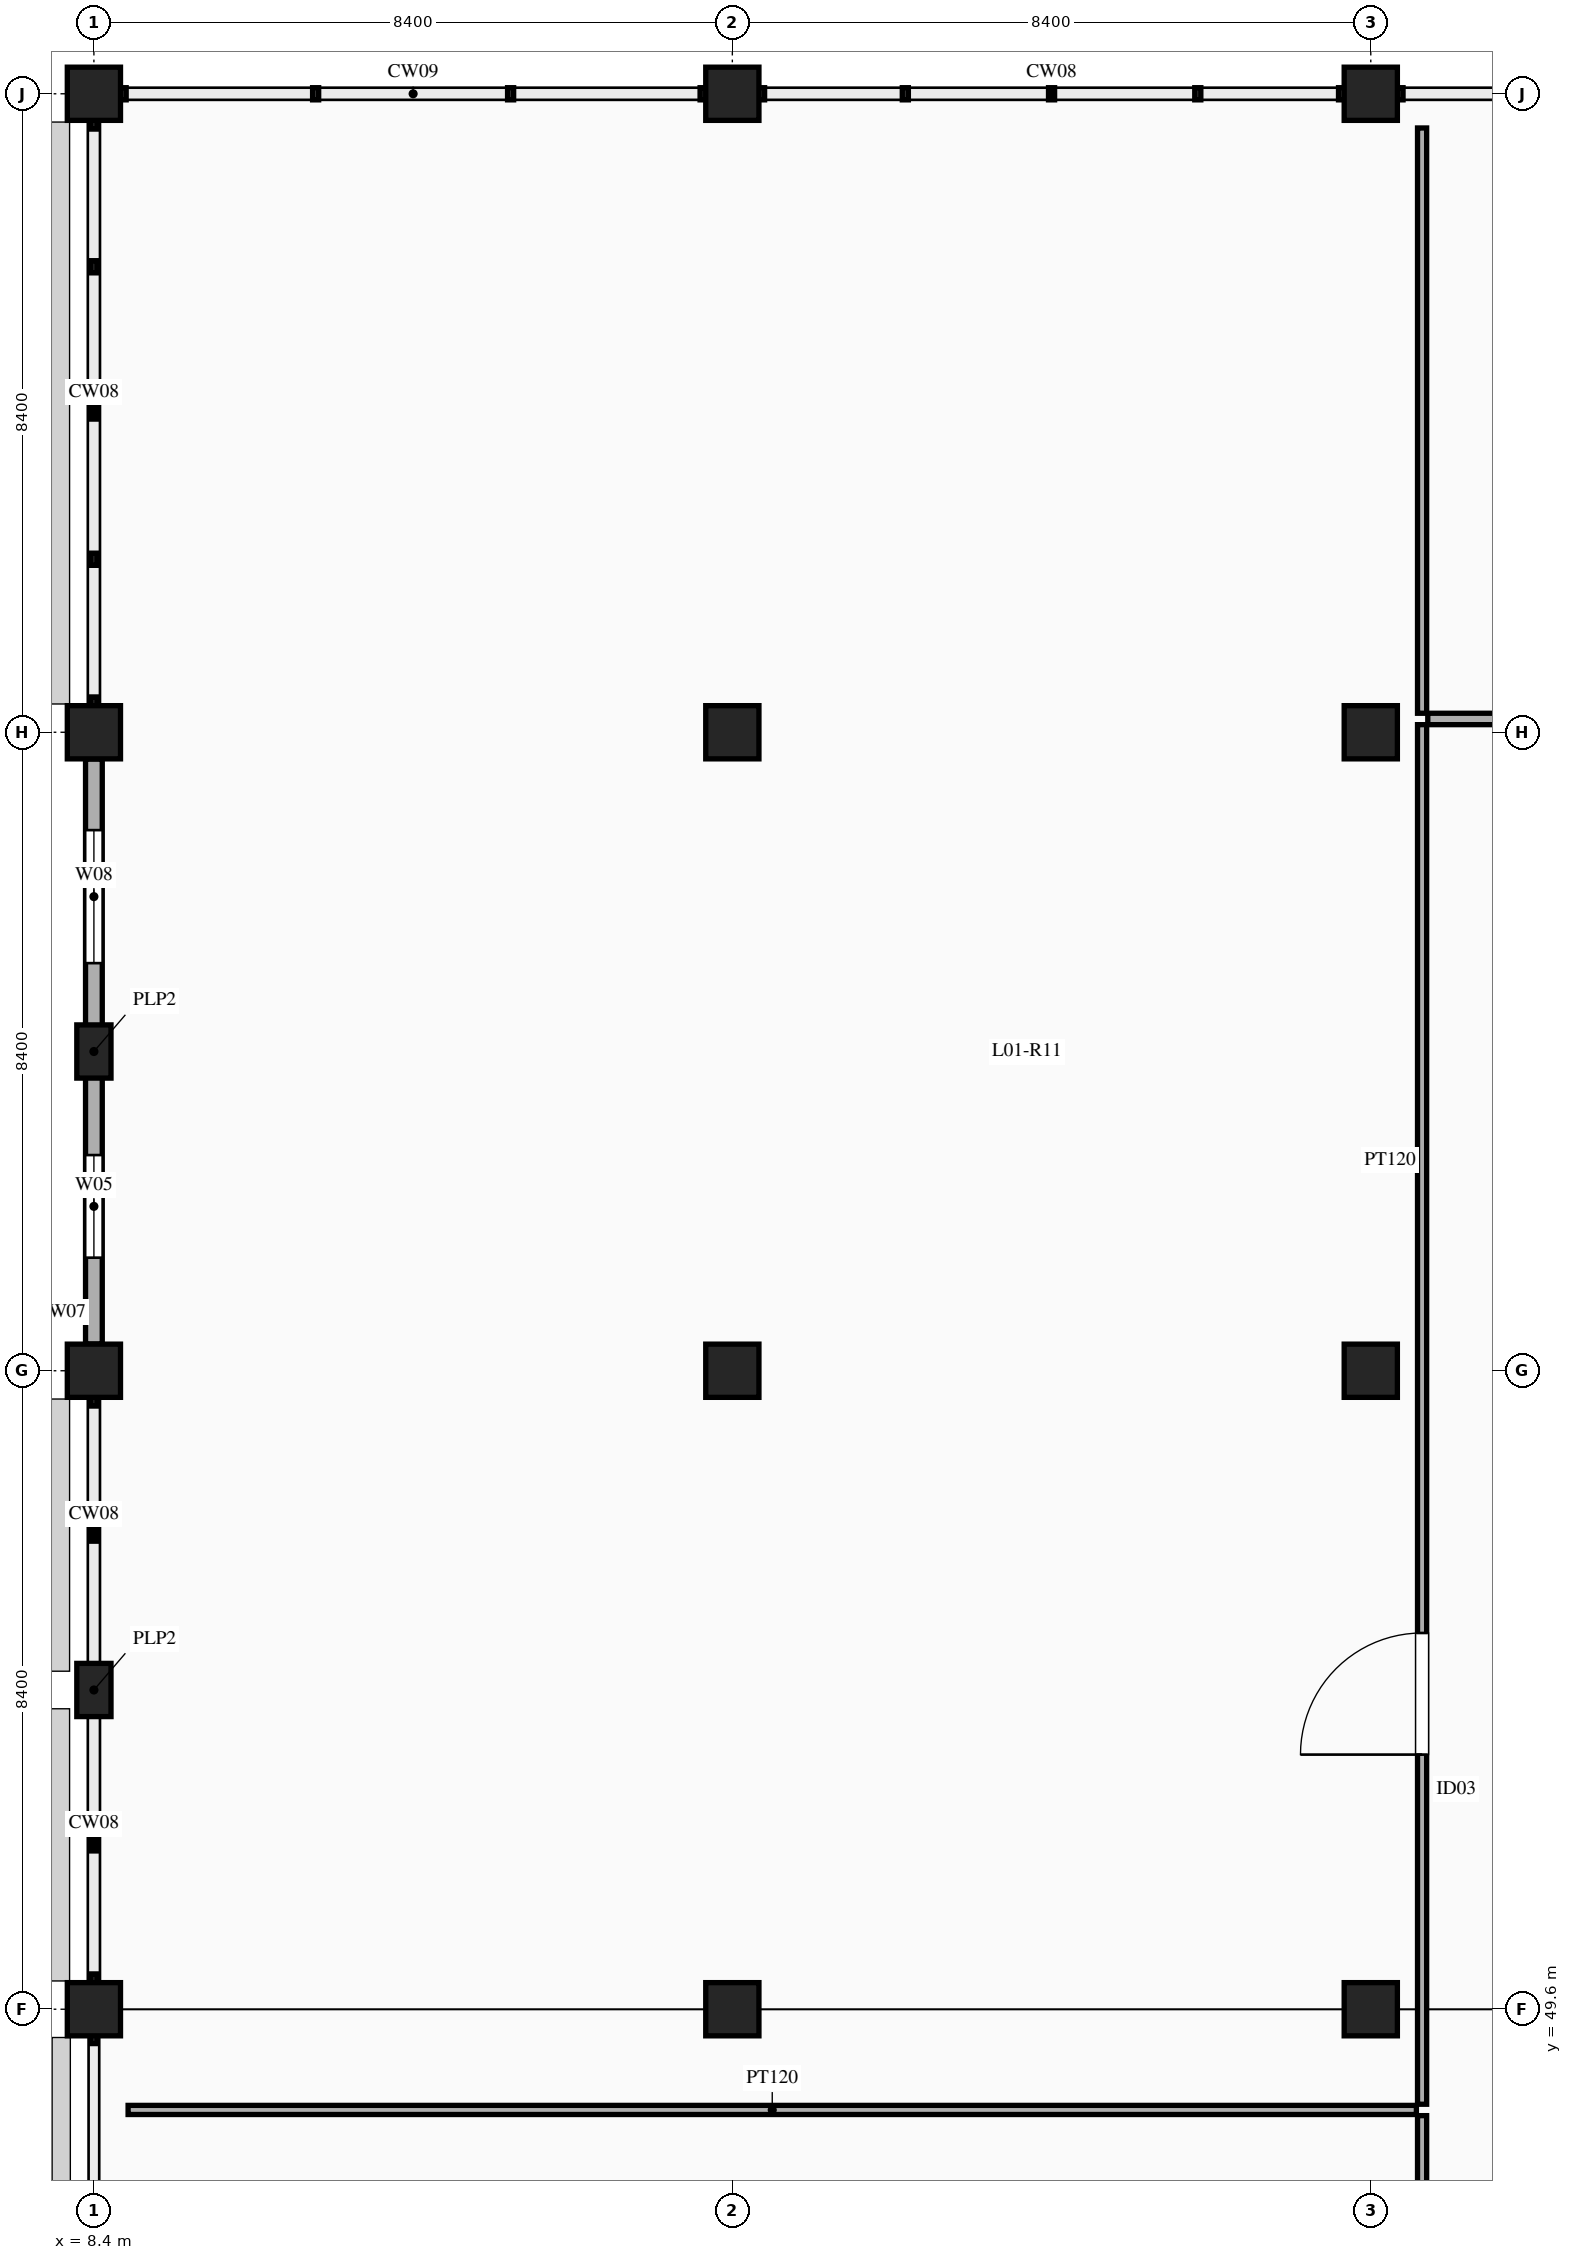
"""IFC4 building model, lengths in metres.
Left out: names, types, materials, properties, quantities, classifications, styles, units other than length and angle.
Written with IfcOpenShell. Run it as: python <this file> out.ifc"""

import sys

from ifc_helpers import new_model, si_unit, direction, frame, frame_2d, origin, origin_2d, place, context, subcontext, project, spatial, rectangle, extrude, element, fill, save


model = new_model("IFC4")
c1 = context("Model", 3, precision=1e-05, world=origin(), true_north=direction((0.0, 1.0)))
c2 = subcontext(c1, "Body", "Model", "MODEL_VIEW")
j1 = project(units=[si_unit("LENGTHUNIT", "METRE"), si_unit("PLANEANGLEUNIT", "RADIAN")], contexts=[c1])
p1 = place(None, origin())
s1 = spatial("IfcSite", under=j1, at=p1, CompositionType="ELEMENT")
p2 = place(p1, origin())
s2 = spatial("IfcBuilding", under=s1, at=p2, CompositionType="ELEMENT")
p3 = place(p2, frame((0.0, 0.0, 5.4)))
s3 = spatial("IfcBuildingStorey", under=s2, at=p3, CompositionType="ELEMENT", Elevation=5.4)
for number, where, z_axis, x_axis in (
    (1, (8.4, 49.6, 0.0), (0.0, 0.0, 1.0), (1.0, 0.0, 0.0)),
    (2, (8.4, 58.0, 0.0), (0.0, 0.0, 1.0), (1.0, 0.0, 0.0)),
    (3, (8.4, 66.4, 0.0), (0.0, 0.0, 1.0), (1.0, 0.0, 0.0)),
    (4, (8.4, 74.8, 0.0), (0.0, 0.0, 1.0), (1.0, 0.0, 0.0)),
    (5, (16.8, 49.6, 0.0), (0.0, 0.0, 1.0), (1.0, 0.0, 0.0)),
    (6, (16.8, 58.0, 0.0), (0.0, 0.0, 1.0), (1.0, 0.0, 0.0)),
    (7, (16.8, 66.4, 0.0), (0.0, 0.0, 1.0), (1.0, 0.0, 0.0)),
    (8, (16.8, 74.8, 0.0), (0.0, 0.0, 1.0), (1.0, 0.0, 0.0)),
    (9, (25.2, 49.6, 0.0), (0.0, 0.0, 1.0), (1.0, 0.0, 0.0)),
    (10, (25.2, 58.0, 0.0), (0.0, 0.0, 1.0), (1.0, 0.0, 0.0)),
    (11, (25.2, 66.4, 0.0), (0.0, 0.0, 1.0), (1.0, 0.0, 0.0)),
    (12, (25.2, 74.8, 0.0), (0.0, 0.0, 1.0), (1.0, 0.0, 0.0)),
):
    element("IfcColumn", number, at=place(p3, frame(where, z_axis=z_axis, x_axis=x_axis)), inside=s3, PredefinedType="COLUMN", context=c2, shape_type="SweptSolid", body=[
        extrude(rectangle(XDim=0.7, YDim=0.7, at=origin_2d()), origin(), (0.0, 0.0, 1.0), 4.8),
    ])
for number, where, z_axis, x_axis in (
    (13, (8.4, 53.8, 0.0), (0.0, 0.0, 1.0), (1.0, 0.0, 0.0)),
    (14, (8.4, 62.2, 0.0), (0.0, 0.0, 1.0), (1.0, 0.0, 0.0)),
):
    element("IfcColumn", number, at=place(p3, frame(where, z_axis=z_axis, x_axis=x_axis)), inside=s3, PredefinedType="PILASTER", context=c2, shape_type="SweptSolid", body=[
        extrude(rectangle(XDim=0.7, YDim=0.45, at=origin_2d()), origin(), (0.0, 0.0, 1.0), 4.8),
    ])
p4 = place(p3, frame((8.4, 58.352, 0.0), z_axis=(0.0, 0.0, 1.0), x_axis=(0.0, 1.0, 0.0)))
e15 = element("IfcWall", 15, at=p4, inside=s3, PredefinedType="USERDEFINED", context=c2, shape_type="SweptSolid", body=[
    extrude(rectangle(XDim=3.621, YDim=0.22, at=frame_2d((1.811, 0.0))), origin(), (0.0, 0.0, 1.0), 3.85),
])
p5 = place(p4, frame((1.135, 0.0, 0.9)))
e16 = element("IfcOpeningElement", 16, at=p5, cuts=e15, PredefinedType="OPENING", context=c2, shape_type="SweptSolid", body=[
    extrude(rectangle(XDim=1.35, YDim=1.85, at=frame_2d((0.675, 0.925))), frame((0.0, 0.12, 0.0), z_axis=(0.0, -1.0, 0.0), x_axis=(1.0, 0.0, 0.0)), (0.0, 0.0, 1.0), 0.24),
])
p6 = place(p3, frame((8.4, 62.427, 0.0), z_axis=(0.0, 0.0, 1.0), x_axis=(0.0, 1.0, 0.0)))
e17 = element("IfcWall", 17, at=p6, inside=s3, PredefinedType="USERDEFINED", context=c2, shape_type="SweptSolid", body=[
    extrude(rectangle(XDim=3.621, YDim=0.22, at=frame_2d((1.811, 0.0))), origin(), (0.0, 0.0, 1.0), 3.85),
])
p7 = place(p6, frame((0.936, 0.0, 0.9)))
e18 = element("IfcOpeningElement", 18, at=p7, cuts=e17, PredefinedType="OPENING", context=c2, shape_type="SweptSolid", body=[
    extrude(rectangle(XDim=1.75, YDim=2.2, at=frame_2d((0.875, 1.1))), frame((0.0, 0.12, 0.0), z_axis=(0.0, -1.0, 0.0), x_axis=(1.0, 0.0, 0.0)), (0.0, 0.0, 1.0), 0.24),
])
p8 = place(p3, frame((25.875, 23.2, 0.0), z_axis=(0.0, 0.0, 1.0), x_axis=(0.0, 1.0, 0.0)))
e19 = element("IfcWall", 19, at=p8, inside=s3, PredefinedType="PARTITIONING", context=c2, shape_type="SweptSolid", body=[
    extrude(rectangle(XDim=25.0, YDim=0.12, at=frame_2d((12.5, 0.0))), origin(), (0.0, 0.0, 1.0), 2.95),
])
p9 = place(p8, frame((14.619, 0.0, 0.0)))
e20 = element("IfcOpeningElement", 20, at=p9, cuts=e19, PredefinedType="OPENING", context=c2, shape_type="SweptSolid", body=[
    extrude(rectangle(XDim=1.6, YDim=2.35, at=frame_2d((0.8, 1.175))), frame((0.0, 0.07, 0.0), z_axis=(0.0, -1.0, 0.0), x_axis=(1.0, 0.0, 0.0)), (0.0, 0.0, 1.0), 0.14),
])
p10 = place(p3, frame((25.875, 48.35, 0.0), z_axis=(0.0, 0.0, 1.0), x_axis=(0.0, 1.0, 0.0)))
e21 = element("IfcWall", 21, at=p10, inside=s3, PredefinedType="PARTITIONING", context=c2, shape_type="SweptSolid", body=[
    extrude(rectangle(XDim=18.15, YDim=0.12, at=frame_2d((9.075, 0.0))), origin(), (0.0, 0.0, 1.0), 2.95),
])
p11 = place(p10, frame((4.6, 0.0, 0.0)))
e22 = element("IfcOpeningElement", 22, at=p11, cuts=e21, PredefinedType="OPENING", context=c2, shape_type="SweptSolid", body=[
    extrude(rectangle(XDim=1.6, YDim=2.35, at=frame_2d((0.8, 1.175))), frame((0.0, 0.07, 0.0), z_axis=(0.0, -1.0, 0.0), x_axis=(1.0, 0.0, 0.0)), (0.0, 0.0, 1.0), 0.14),
])
p12 = place(p3, frame((25.95, 66.575, 0.0), z_axis=(0.0, 0.0, 1.0), x_axis=(1.0, 0.0, 0.0)))
e23 = element("IfcWall", 23, at=p12, inside=s3, PredefinedType="PARTITIONING", context=c2, shape_type="SweptSolid", body=[
    extrude(rectangle(XDim=2.8, YDim=0.15, at=frame_2d((1.4, 0.0))), origin(), (0.0, 0.0, 1.0), 2.95),
])
p13 = place(p3, frame((8.85, 48.275, 0.0), z_axis=(0.0, 0.0, 1.0), x_axis=(1.0, 0.0, 0.0)))
e24 = element("IfcWall", 24, at=p13, inside=s3, PredefinedType="PARTITIONING", context=c2, shape_type="SweptSolid", body=[
    extrude(rectangle(XDim=16.95, YDim=0.12, at=frame_2d((8.475, 0.0))), origin(), (0.0, 0.0, 1.0), 2.95),
])
p14 = place(p3, frame((25.875, 66.65, 0.0), z_axis=(0.0, 0.0, 1.0), x_axis=(0.0, 1.0, 0.0)))
e25 = element("IfcWall", 25, at=p14, inside=s3, PredefinedType="PARTITIONING", context=c2, shape_type="SweptSolid", body=[
    extrude(rectangle(XDim=7.7, YDim=0.12, at=frame_2d((3.85, 0.0))), origin(), (0.0, 0.0, 1.0), 2.95),
])
p15 = place(p5, origin())
e26 = element("IfcWindow", 26, at=p15, inside=s3, PartitioningType="DOUBLE_PANEL_VERTICAL", PredefinedType="WINDOW", context=c2, shape_type="SweptSolid", body=[
    extrude(rectangle(XDim=1.35, YDim=1.85, at=frame_2d((0.675, 0.925))), frame((0.0, 0.03, 0.0), z_axis=(0.0, -1.0, 0.0), x_axis=(1.0, 0.0, 0.0)), (0.0, 0.0, 1.0), 0.06),
])
fill(e16, e26)
p16 = place(p7, origin())
e27 = element("IfcWindow", 27, at=p16, inside=s3, PartitioningType="DOUBLE_PANEL_VERTICAL", PredefinedType="WINDOW", context=c2, shape_type="SweptSolid", body=[
    extrude(rectangle(XDim=1.75, YDim=2.2, at=frame_2d((0.875, 1.1))), frame((0.0, 0.03, 0.0), z_axis=(0.0, -1.0, 0.0), x_axis=(1.0, 0.0, 0.0)), (0.0, 0.0, 1.0), 0.06),
])
fill(e18, e27)
p17 = place(p11, origin())
e28 = element("IfcDoor", 28, at=p17, inside=s3, OperationType="SINGLE_SWING_LEFT", PredefinedType="DOOR", context=c2, shape_type="SweptSolid", body=[
    extrude(rectangle(XDim=1.6, YDim=2.35, at=frame_2d((0.8, 1.175))), frame((0.0, 0.025, 0.0), z_axis=(0.0, -1.0, 0.0), x_axis=(1.0, 0.0, 0.0)), (0.0, 0.0, 1.0), 0.05),
])
fill(e22, e28)
save(model, sys.argv[1])
